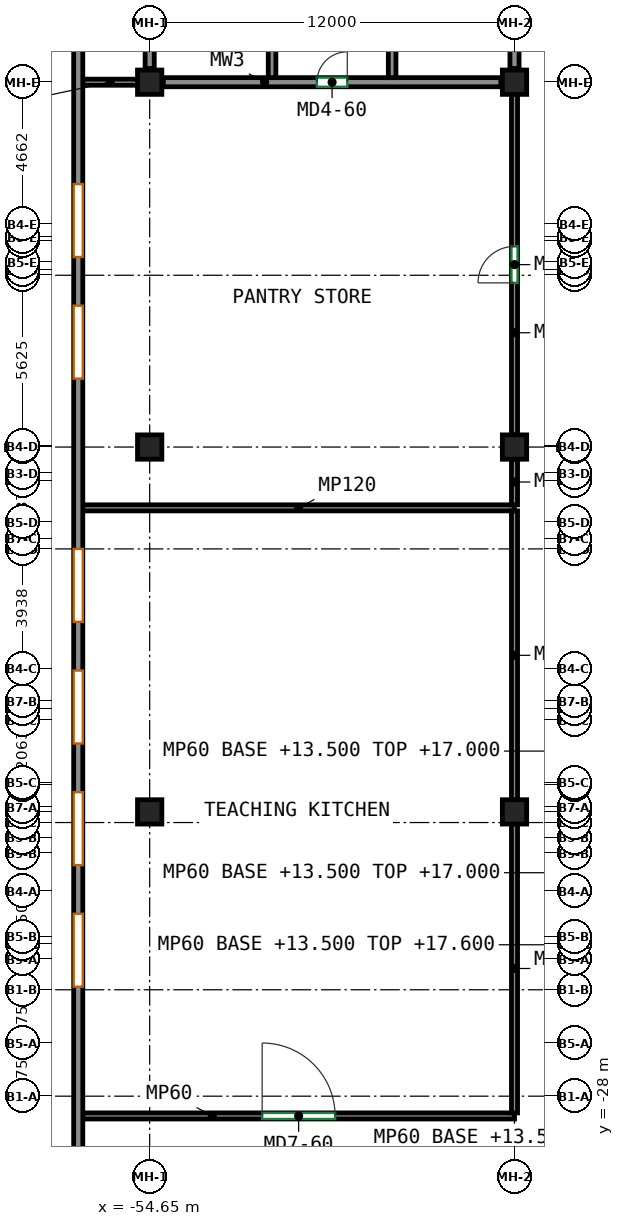
"""IFC4 building model, lengths in metres.
Left out: names, types, materials, properties, quantities, classifications, styles, units other than length and angle.
Written with IfcOpenShell. Run it as: python <this file> out.ifc"""

import sys

from ifc_helpers import new_model, si_unit, direction, frame, frame_2d, origin, origin_2d, place, context, subcontext, project, spatial, rectangle, extrude, source, transform, mapped, element, fill, save


model = new_model("IFC4")
c1 = context("Model", 3, precision=1e-05, world=origin(), true_north=direction((0.0, 1.0)))
c2 = subcontext(c1, "Body", "Model", "MODEL_VIEW")
j1 = project(units=[si_unit("LENGTHUNIT", "METRE"), si_unit("PLANEANGLEUNIT", "RADIAN")], contexts=[c1])
p1 = place(None, origin())
s1 = spatial("IfcSite", under=j1, at=p1, CompositionType="ELEMENT")
p2 = place(p1, origin())
s2 = spatial("IfcBuilding", under=s1, at=p2, CompositionType="ELEMENT")
p3 = place(p2, frame((0.0, 0.0, 13.5)))
s3 = spatial("IfcBuildingStorey", under=s2, at=p3, CompositionType="ELEMENT", Elevation=13.5)
m1 = source(origin(), c2, "Body", "SweptSolid", [
    extrude(rectangle(XDim=0.8, YDim=0.8, at=origin_2d()), origin(), (0.0, 0.0, 1.0), 4.1),
])
for number, where, z_axis, x_axis in (
    (1, (-54.65, -18.65, 0.0), (0.0, 0.0, 1.0), (1.0, 0.0, 0.0)),
    (2, (-54.65, -6.65, 0.0), (0.0, 0.0, 1.0), (1.0, 0.0, 0.0)),
    (3, (-54.65, 5.35, 0.0), (0.0, 0.0, 1.0), (1.0, 0.0, 0.0)),
    (4, (-42.65, -18.65, 0.0), (0.0, 0.0, 1.0), (1.0, 0.0, 0.0)),
    (5, (-42.65, -6.65, 0.0), (0.0, 0.0, 1.0), (1.0, 0.0, 0.0)),
    (6, (-42.65, 5.35, 0.0), (0.0, 0.0, 1.0), (1.0, 0.0, 0.0)),
):
    element("IfcColumn", number, at=place(p3, frame(where, z_axis=z_axis, x_axis=x_axis)), inside=s3, PredefinedType="COLUMN", context=c2, shape_type="MappedRepresentation", body=[
        mapped(m1, transform((0.0, 0.0, 0.0))),
    ])
m2 = source(origin(), c2, "Body", "SweptSolid", [
    extrude(rectangle(XDim=11.1, YDim=0.3, at=frame_2d((5.55, 0.0))), origin(), (0.0, 0.0, 1.0), 3.3),
])
p4 = place(p3, frame((-54.2, 5.35, 0.0), z_axis=(0.0, 0.0, 1.0), x_axis=(1.0, 0.0, 0.0)))
e7 = element("IfcWall", 7, at=p4, inside=s3, PredefinedType="SHEAR", context=c2, shape_type="MappedRepresentation", body=[
    mapped(m2, transform((0.0, 0.0, 0.0))),
])
p5 = place(p4, frame((5.05, 0.0, 0.0)))
e8 = element("IfcOpeningElement", 8, at=p5, cuts=e7, PredefinedType="OPENING", context=c2, shape_type="SweptSolid", body=[
    extrude(rectangle(XDim=1.0, YDim=2.1, at=frame_2d((0.5, 1.05))), frame((0.0, 0.16, 0.0), z_axis=(0.0, -1.0, 0.0), x_axis=(1.0, 0.0, 0.0)), (0.0, 0.0, 1.0), 0.32),
])
for number, where, z_axis, x_axis in (
    (9, (-54.65, 5.8, 0.0), (0.0, 0.0, 1.0), (0.0, 1.0, 0.0)),
    (10, (-42.65, 5.8, 0.0), (0.0, 0.0, 1.0), (0.0, 1.0, 0.0)),
):
    element("IfcWall", number, at=place(p3, frame(where, z_axis=z_axis, x_axis=x_axis)), inside=s3, PredefinedType="SHEAR", context=c2, shape_type="MappedRepresentation", body=[
        mapped(m2, transform((0.0, 0.0, 0.0))),
    ])
m3 = source(origin(), c2, "Body", "SweptSolid", [
    extrude(rectangle(XDim=9.85, YDim=0.25, at=frame_2d((4.925, 0.0))), origin(), (0.0, 0.0, 1.0), 4.1),
])
for number, where, z_axis, x_axis in (
    (11, (-50.625, 5.5, 0.0), (0.0, 0.0, 1.0), (0.0, 1.0, 0.0)),
    (12, (-46.675, 5.5, 0.0), (0.0, 0.0, 1.0), (0.0, 1.0, 0.0)),
):
    element("IfcWall", number, at=place(p3, frame(where, z_axis=z_axis, x_axis=x_axis)), inside=s3, PredefinedType="SHEAR", context=c2, shape_type="MappedRepresentation", body=[
        mapped(m3, transform((0.0, 0.0, 0.0))),
    ])
m4 = source(origin(), c2, "Body", "SweptSolid", [
    extrude(rectangle(XDim=100.7, YDim=0.3, at=frame_2d((50.35, 0.0))), origin(), (0.0, 0.0, 1.0), 4.1),
])
p6 = place(p3, frame((-57.0, -43.55, 0.0), z_axis=(0.0, 0.0, 1.0), x_axis=(0.0, 1.0, 0.0)))
e13 = element("IfcWall", 13, at=p6, inside=s3, PredefinedType="SOLIDWALL", context=c2, shape_type="MappedRepresentation", body=[
    mapped(m4, transform((0.0, 0.0, 0.0))),
])
p7 = place(p6, frame((3.15, 0.0, 0.9)))
e14 = element("IfcOpeningElement", 14, at=p7, cuts=e13, PredefinedType="OPENING", context=c2, shape_type="SweptSolid", body=[
    extrude(rectangle(XDim=2.4, YDim=1.8, at=frame_2d((1.2, 0.9))), frame((0.0, 0.16, 0.0), z_axis=(0.0, -1.0, 0.0), x_axis=(1.0, 0.0, 0.0)), (0.0, 0.0, 1.0), 0.32),
])
p8 = place(p6, frame((7.15, 0.0, 0.9)))
e15 = element("IfcOpeningElement", 15, at=p8, cuts=e13, PredefinedType="OPENING", context=c2, shape_type="SweptSolid", body=[
    extrude(rectangle(XDim=2.4, YDim=1.8, at=frame_2d((1.2, 0.9))), frame((0.0, 0.16, 0.0), z_axis=(0.0, -1.0, 0.0), x_axis=(1.0, 0.0, 0.0)), (0.0, 0.0, 1.0), 0.32),
])
p9 = place(p6, frame((11.15, 0.0, 0.9)))
e16 = element("IfcOpeningElement", 16, at=p9, cuts=e13, PredefinedType="OPENING", context=c2, shape_type="SweptSolid", body=[
    extrude(rectangle(XDim=2.4, YDim=1.8, at=frame_2d((1.2, 0.9))), frame((0.0, 0.16, 0.0), z_axis=(0.0, -1.0, 0.0), x_axis=(1.0, 0.0, 0.0)), (0.0, 0.0, 1.0), 0.32),
])
p10 = place(p6, frame((19.15, 0.0, 0.9)))
e17 = element("IfcOpeningElement", 17, at=p10, cuts=e13, PredefinedType="OPENING", context=c2, shape_type="SweptSolid", body=[
    extrude(rectangle(XDim=2.4, YDim=1.8, at=frame_2d((1.2, 0.9))), frame((0.0, 0.16, 0.0), z_axis=(0.0, -1.0, 0.0), x_axis=(1.0, 0.0, 0.0)), (0.0, 0.0, 1.0), 0.32),
])
p11 = place(p6, frame((23.15, 0.0, 0.9)))
e18 = element("IfcOpeningElement", 18, at=p11, cuts=e13, PredefinedType="OPENING", context=c2, shape_type="SweptSolid", body=[
    extrude(rectangle(XDim=2.4, YDim=1.8, at=frame_2d((1.2, 0.9))), frame((0.0, 0.16, 0.0), z_axis=(0.0, -1.0, 0.0), x_axis=(1.0, 0.0, 0.0)), (0.0, 0.0, 1.0), 0.32),
])
p12 = place(p6, frame((27.15, 0.0, 0.9)))
e19 = element("IfcOpeningElement", 19, at=p12, cuts=e13, PredefinedType="OPENING", context=c2, shape_type="SweptSolid", body=[
    extrude(rectangle(XDim=2.4, YDim=1.8, at=frame_2d((1.2, 0.9))), frame((0.0, 0.16, 0.0), z_axis=(0.0, -1.0, 0.0), x_axis=(1.0, 0.0, 0.0)), (0.0, 0.0, 1.0), 0.32),
])
p13 = place(p6, frame((31.15, 0.0, 0.9)))
e20 = element("IfcOpeningElement", 20, at=p13, cuts=e13, PredefinedType="OPENING", context=c2, shape_type="SweptSolid", body=[
    extrude(rectangle(XDim=2.4, YDim=1.8, at=frame_2d((1.2, 0.9))), frame((0.0, 0.16, 0.0), z_axis=(0.0, -1.0, 0.0), x_axis=(1.0, 0.0, 0.0)), (0.0, 0.0, 1.0), 0.32),
])
p14 = place(p6, frame((39.15, 0.0, 0.9)))
e21 = element("IfcOpeningElement", 21, at=p14, cuts=e13, PredefinedType="OPENING", context=c2, shape_type="SweptSolid", body=[
    extrude(rectangle(XDim=2.4, YDim=1.8, at=frame_2d((1.2, 0.9))), frame((0.0, 0.16, 0.0), z_axis=(0.0, -1.0, 0.0), x_axis=(1.0, 0.0, 0.0)), (0.0, 0.0, 1.0), 0.32),
])
p15 = place(p6, frame((43.15, 0.0, 0.9)))
e22 = element("IfcOpeningElement", 22, at=p15, cuts=e13, PredefinedType="OPENING", context=c2, shape_type="SweptSolid", body=[
    extrude(rectangle(XDim=2.4, YDim=1.8, at=frame_2d((1.2, 0.9))), frame((0.0, 0.16, 0.0), z_axis=(0.0, -1.0, 0.0), x_axis=(1.0, 0.0, 0.0)), (0.0, 0.0, 1.0), 0.32),
])
p16 = place(p6, frame((51.15, 0.0, 0.9)))
e23 = element("IfcOpeningElement", 23, at=p16, cuts=e13, PredefinedType="OPENING", context=c2, shape_type="SweptSolid", body=[
    extrude(rectangle(XDim=2.4, YDim=1.8, at=frame_2d((1.2, 0.9))), frame((0.0, 0.16, 0.0), z_axis=(0.0, -1.0, 0.0), x_axis=(1.0, 0.0, 0.0)), (0.0, 0.0, 1.0), 0.32),
])
p17 = place(p6, frame((55.15, 0.0, 0.9)))
e24 = element("IfcOpeningElement", 24, at=p17, cuts=e13, PredefinedType="OPENING", context=c2, shape_type="SweptSolid", body=[
    extrude(rectangle(XDim=2.4, YDim=1.8, at=frame_2d((1.2, 0.9))), frame((0.0, 0.16, 0.0), z_axis=(0.0, -1.0, 0.0), x_axis=(1.0, 0.0, 0.0)), (0.0, 0.0, 1.0), 0.32),
])
p18 = place(p6, frame((59.15, 0.0, 0.9)))
e25 = element("IfcOpeningElement", 25, at=p18, cuts=e13, PredefinedType="OPENING", context=c2, shape_type="SweptSolid", body=[
    extrude(rectangle(XDim=2.4, YDim=1.8, at=frame_2d((1.2, 0.9))), frame((0.0, 0.16, 0.0), z_axis=(0.0, -1.0, 0.0), x_axis=(1.0, 0.0, 0.0)), (0.0, 0.0, 1.0), 0.32),
])
p19 = place(p6, frame((63.15, 0.0, 0.9)))
e26 = element("IfcOpeningElement", 26, at=p19, cuts=e13, PredefinedType="OPENING", context=c2, shape_type="SweptSolid", body=[
    extrude(rectangle(XDim=2.4, YDim=1.8, at=frame_2d((1.2, 0.9))), frame((0.0, 0.16, 0.0), z_axis=(0.0, -1.0, 0.0), x_axis=(1.0, 0.0, 0.0)), (0.0, 0.0, 1.0), 0.32),
])
p20 = place(p6, frame((67.15, 0.0, 0.9)))
e27 = element("IfcOpeningElement", 27, at=p20, cuts=e13, PredefinedType="OPENING", context=c2, shape_type="SweptSolid", body=[
    extrude(rectangle(XDim=2.4, YDim=1.8, at=frame_2d((1.2, 0.9))), frame((0.0, 0.16, 0.0), z_axis=(0.0, -1.0, 0.0), x_axis=(1.0, 0.0, 0.0)), (0.0, 0.0, 1.0), 0.32),
])
p21 = place(p6, frame((75.15, 0.0, 0.9)))
e28 = element("IfcOpeningElement", 28, at=p21, cuts=e13, PredefinedType="OPENING", context=c2, shape_type="SweptSolid", body=[
    extrude(rectangle(XDim=2.4, YDim=1.8, at=frame_2d((1.2, 0.9))), frame((0.0, 0.16, 0.0), z_axis=(0.0, -1.0, 0.0), x_axis=(1.0, 0.0, 0.0)), (0.0, 0.0, 1.0), 0.32),
])
p22 = place(p6, frame((79.15, 0.0, 0.9)))
e29 = element("IfcOpeningElement", 29, at=p22, cuts=e13, PredefinedType="OPENING", context=c2, shape_type="SweptSolid", body=[
    extrude(rectangle(XDim=2.4, YDim=1.8, at=frame_2d((1.2, 0.9))), frame((0.0, 0.16, 0.0), z_axis=(0.0, -1.0, 0.0), x_axis=(1.0, 0.0, 0.0)), (0.0, 0.0, 1.0), 0.32),
])
p23 = place(p6, frame((83.15, 0.0, 0.9)))
e30 = element("IfcOpeningElement", 30, at=p23, cuts=e13, PredefinedType="OPENING", context=c2, shape_type="SweptSolid", body=[
    extrude(rectangle(XDim=2.4, YDim=1.8, at=frame_2d((1.2, 0.9))), frame((0.0, 0.16, 0.0), z_axis=(0.0, -1.0, 0.0), x_axis=(1.0, 0.0, 0.0)), (0.0, 0.0, 1.0), 0.32),
])
p24 = place(p6, frame((87.15, 0.0, 0.9)))
e31 = element("IfcOpeningElement", 31, at=p24, cuts=e13, PredefinedType="OPENING", context=c2, shape_type="SweptSolid", body=[
    extrude(rectangle(XDim=2.4, YDim=1.8, at=frame_2d((1.2, 0.9))), frame((0.0, 0.16, 0.0), z_axis=(0.0, -1.0, 0.0), x_axis=(1.0, 0.0, 0.0)), (0.0, 0.0, 1.0), 0.32),
])
p25 = place(p6, frame((91.15, 0.0, 0.9)))
e32 = element("IfcOpeningElement", 32, at=p25, cuts=e13, PredefinedType="OPENING", context=c2, shape_type="SweptSolid", body=[
    extrude(rectangle(XDim=2.4, YDim=1.8, at=frame_2d((1.2, 0.9))), frame((0.0, 0.16, 0.0), z_axis=(0.0, -1.0, 0.0), x_axis=(1.0, 0.0, 0.0)), (0.0, 0.0, 1.0), 0.32),
])
p26 = place(p6, frame((95.15, 0.0, 0.9)))
e33 = element("IfcOpeningElement", 33, at=p26, cuts=e13, PredefinedType="OPENING", context=c2, shape_type="SweptSolid", body=[
    extrude(rectangle(XDim=2.4, YDim=1.8, at=frame_2d((1.2, 0.9))), frame((0.0, 0.16, 0.0), z_axis=(0.0, -1.0, 0.0), x_axis=(1.0, 0.0, 0.0)), (0.0, 0.0, 1.0), 0.32),
])
m5 = source(origin(), c2, "Body", "SweptSolid", [
    extrude(rectangle(XDim=14.2, YDim=0.2, at=frame_2d((7.1, 0.0))), origin(), (0.0, 0.0, 1.0), 3.3),
])
p27 = place(p3, frame((-56.85, -28.65, 0.0), z_axis=(0.0, 0.0, 1.0), x_axis=(1.0, 0.0, 0.0)))
e34 = element("IfcWall", 34, at=p27, inside=s3, PredefinedType="PARTITIONING", context=c2, shape_type="MappedRepresentation", body=[
    mapped(m5, transform((0.0, 0.0, 0.0))),
])
p28 = place(p27, frame((5.9, 0.0, 0.0)))
e35 = element("IfcOpeningElement", 35, at=p28, cuts=e34, PredefinedType="OPENING", context=c2, shape_type="SweptSolid", body=[
    extrude(rectangle(XDim=2.4, YDim=2.4, at=frame_2d((1.2, 1.2))), frame((0.0, 0.11, 0.0), z_axis=(0.0, -1.0, 0.0), x_axis=(1.0, 0.0, 0.0)), (0.0, 0.0, 1.0), 0.22),
])
p29 = place(p3, frame((-56.85, -8.65, 0.0), z_axis=(0.0, 0.0, 1.0), x_axis=(1.0, 0.0, 0.0)))
e36 = element("IfcWall", 36, at=p29, inside=s3, PredefinedType="PARTITIONING", context=c2, shape_type="MappedRepresentation", body=[
    mapped(m5, transform((0.0, 0.0, 0.0))),
])
m6 = source(origin(), c2, "Body", "SweptSolid", [
    extrude(rectangle(XDim=1.8, YDim=0.2, at=frame_2d((0.9, 0.0))), origin(), (0.0, 0.0, 1.0), 4.1),
])
p30 = place(p3, frame((-56.85, 5.35, 0.0), z_axis=(0.0, 0.0, 1.0), x_axis=(1.0, 0.0, 0.0)))
e37 = element("IfcWall", 37, at=p30, inside=s3, PredefinedType="PARTITIONING", context=c2, shape_type="MappedRepresentation", body=[
    mapped(m6, transform((0.0, 0.0, 0.0))),
])
m7 = source(origin(), c2, "Body", "SweptSolid", [
    extrude(rectangle(XDim=9.5, YDim=0.2, at=frame_2d((4.75, 0.0))), origin(), (0.0, 0.0, 1.0), 3.3),
])
for number, where, z_axis, x_axis in (
    (38, (-42.65, -28.55, 0.0), (0.0, 0.0, 1.0), (0.0, 1.0, 0.0)),
    (39, (-42.65, -18.25, 0.0), (0.0, 0.0, 1.0), (0.0, 1.0, 0.0)),
):
    element("IfcWall", number, at=place(p3, frame(where, z_axis=z_axis, x_axis=x_axis)), inside=s3, PredefinedType="PARTITIONING", context=c2, shape_type="MappedRepresentation", body=[
        mapped(m7, transform((0.0, 0.0, 0.0))),
    ])
m8 = source(origin(), c2, "Body", "SweptSolid", [
    extrude(rectangle(XDim=1.5, YDim=0.2, at=frame_2d((0.75, 0.0))), origin(), (0.0, 0.0, 1.0), 3.3),
])
p31 = place(p3, frame((-42.65, -8.55, 0.0), z_axis=(0.0, 0.0, 1.0), x_axis=(0.0, 1.0, 0.0)))
e40 = element("IfcWall", 40, at=p31, inside=s3, PredefinedType="PARTITIONING", context=c2, shape_type="MappedRepresentation", body=[
    mapped(m8, transform((0.0, 0.0, 0.0))),
])
m9 = source(origin(), c2, "Body", "SweptSolid", [
    extrude(rectangle(XDim=11.2, YDim=0.2, at=frame_2d((5.6, 0.0))), origin(), (0.0, 0.0, 1.0), 3.3),
])
p32 = place(p3, frame((-42.65, -6.25, 0.0), z_axis=(0.0, 0.0, 1.0), x_axis=(0.0, 1.0, 0.0)))
e41 = element("IfcWall", 41, at=p32, inside=s3, PredefinedType="PARTITIONING", context=c2, shape_type="MappedRepresentation", body=[
    mapped(m9, transform((0.0, 0.0, 0.0))),
])
p33 = place(p32, frame((5.0, 0.0, 0.0)))
e42 = element("IfcOpeningElement", 42, at=p33, cuts=e41, PredefinedType="OPENING", context=c2, shape_type="SweptSolid", body=[
    extrude(rectangle(XDim=1.2, YDim=2.1, at=frame_2d((0.6, 1.05))), frame((0.0, 0.11, 0.0), z_axis=(0.0, -1.0, 0.0), x_axis=(1.0, 0.0, 0.0)), (0.0, 0.0, 1.0), 0.22),
])
p34 = place(p10, origin())
e43 = element("IfcWindow", 43, at=p34, inside=s3, PartitioningType="SINGLE_PANEL", PredefinedType="WINDOW", context=c2, shape_type="SweptSolid", body=[
    extrude(rectangle(XDim=2.4, YDim=1.8, at=frame_2d((1.2, 0.9))), frame((0.0, 0.03, 0.0), z_axis=(0.0, -1.0, 0.0), x_axis=(1.0, 0.0, 0.0)), (0.0, 0.0, 1.0), 0.06),
])
fill(e17, e43)
p35 = place(p11, origin())
e44 = element("IfcWindow", 44, at=p35, inside=s3, PartitioningType="SINGLE_PANEL", PredefinedType="WINDOW", context=c2, shape_type="SweptSolid", body=[
    extrude(rectangle(XDim=2.4, YDim=1.8, at=frame_2d((1.2, 0.9))), frame((0.0, 0.03, 0.0), z_axis=(0.0, -1.0, 0.0), x_axis=(1.0, 0.0, 0.0)), (0.0, 0.0, 1.0), 0.06),
])
fill(e18, e44)
p36 = place(p12, origin())
e45 = element("IfcWindow", 45, at=p36, inside=s3, PartitioningType="SINGLE_PANEL", PredefinedType="WINDOW", context=c2, shape_type="SweptSolid", body=[
    extrude(rectangle(XDim=2.4, YDim=1.8, at=frame_2d((1.2, 0.9))), frame((0.0, 0.03, 0.0), z_axis=(0.0, -1.0, 0.0), x_axis=(1.0, 0.0, 0.0)), (0.0, 0.0, 1.0), 0.06),
])
fill(e19, e45)
p37 = place(p13, origin())
e46 = element("IfcWindow", 46, at=p37, inside=s3, PartitioningType="SINGLE_PANEL", PredefinedType="WINDOW", context=c2, shape_type="SweptSolid", body=[
    extrude(rectangle(XDim=2.4, YDim=1.8, at=frame_2d((1.2, 0.9))), frame((0.0, 0.03, 0.0), z_axis=(0.0, -1.0, 0.0), x_axis=(1.0, 0.0, 0.0)), (0.0, 0.0, 1.0), 0.06),
])
fill(e20, e46)
p38 = place(p14, origin())
e47 = element("IfcWindow", 47, at=p38, inside=s3, PartitioningType="SINGLE_PANEL", PredefinedType="WINDOW", context=c2, shape_type="SweptSolid", body=[
    extrude(rectangle(XDim=2.4, YDim=1.8, at=frame_2d((1.2, 0.9))), frame((0.0, 0.03, 0.0), z_axis=(0.0, -1.0, 0.0), x_axis=(1.0, 0.0, 0.0)), (0.0, 0.0, 1.0), 0.06),
])
fill(e21, e47)
p39 = place(p15, origin())
e48 = element("IfcWindow", 48, at=p39, inside=s3, PartitioningType="SINGLE_PANEL", PredefinedType="WINDOW", context=c2, shape_type="SweptSolid", body=[
    extrude(rectangle(XDim=2.4, YDim=1.8, at=frame_2d((1.2, 0.9))), frame((0.0, 0.03, 0.0), z_axis=(0.0, -1.0, 0.0), x_axis=(1.0, 0.0, 0.0)), (0.0, 0.0, 1.0), 0.06),
])
fill(e22, e48)
p40 = place(p5, origin())
e49 = element("IfcDoor", 49, at=p40, inside=s3, OperationType="SINGLE_SWING_RIGHT", PredefinedType="DOOR", context=c2, shape_type="SweptSolid", body=[
    extrude(rectangle(XDim=1.0, YDim=2.1, at=frame_2d((0.5, 1.05))), frame((0.0, 0.025, 0.0), z_axis=(0.0, -1.0, 0.0), x_axis=(1.0, 0.0, 0.0)), (0.0, 0.0, 1.0), 0.05),
])
fill(e8, e49)
p41 = place(p28, origin())
e50 = element("IfcDoor", 50, at=p41, inside=s3, OperationType="DOUBLE_DOOR_SINGLE_SWING", PredefinedType="DOOR", context=c2, shape_type="SweptSolid", body=[
    extrude(rectangle(XDim=2.4, YDim=2.4, at=frame_2d((1.2, 1.2))), frame((0.0, 0.025, 0.0), z_axis=(0.0, -1.0, 0.0), x_axis=(1.0, 0.0, 0.0)), (0.0, 0.0, 1.0), 0.05),
])
fill(e35, e50)
p42 = place(p33, origin())
e51 = element("IfcDoor", 51, at=p42, inside=s3, OperationType="SINGLE_SWING_LEFT", PredefinedType="DOOR", context=c2, shape_type="SweptSolid", body=[
    extrude(rectangle(XDim=1.2, YDim=2.1, at=frame_2d((0.6, 1.05))), frame((0.0, 0.025, 0.0), z_axis=(0.0, -1.0, 0.0), x_axis=(1.0, 0.0, 0.0)), (0.0, 0.0, 1.0), 0.05),
])
fill(e42, e51)
save(model, sys.argv[1])
